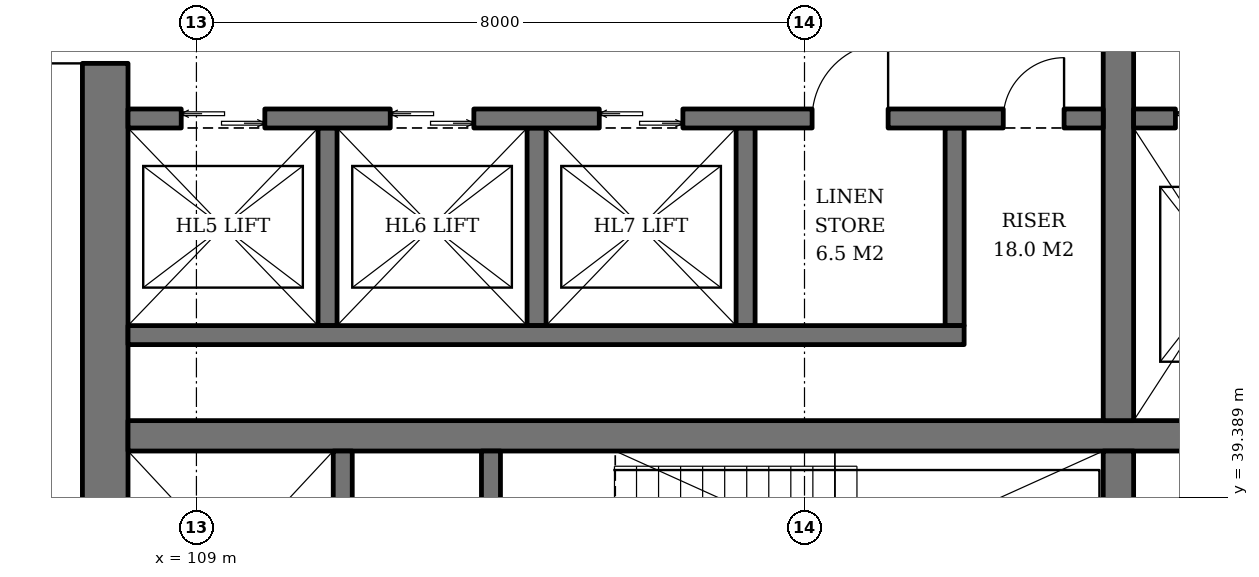
"""IFC4 building model, lengths in metres.
Left out: names, types, materials, properties, quantities, classifications, styles, units other than length and angle.
Written with IfcOpenShell. Run it as: python <this file> out.ifc"""

import sys

from ifc_helpers import new_model, si_unit, direction, frame, frame_2d, origin, place, context, subcontext, project, spatial, rectangle, extrude, element, fill, save


model = new_model("IFC4")
c1 = context("Model", 3, precision=1e-05, world=origin(), true_north=direction((0.0, 1.0)))
c2 = subcontext(c1, "Body", "Model", "MODEL_VIEW")
j1 = project(units=[si_unit("LENGTHUNIT", "METRE"), si_unit("PLANEANGLEUNIT", "RADIAN")], contexts=[c1])
p1 = place(None, origin())
s1 = spatial("IfcSite", under=j1, at=p1, CompositionType="ELEMENT")
p2 = place(p1, origin())
s2 = spatial("IfcBuilding", under=s1, at=p2, CompositionType="ELEMENT")
p3 = place(p2, frame((0.0, 0.0, 55.2)))
s3 = spatial("IfcBuildingStorey", under=s2, at=p3, CompositionType="ELEMENT", Elevation=55.2)
p4 = place(p3, frame((107.8, 37.1, 0.0), z_axis=(0.0, 0.0, 1.0), x_axis=(0.0, 1.0, 0.0)))
e1 = element("IfcWall", 1, at=p4, inside=s3, PredefinedType="SHEAR", context=c2, shape_type="SweptSolid", body=[
    extrude(rectangle(XDim=17.8, YDim=0.6, at=frame_2d((8.9, 0.0))), origin(), (0.0, 0.0, 1.0), 3.8),
])
p5 = place(p4, frame((8.0, 0.0, 0.0)))
e2 = element("IfcOpeningElement", 2, at=p5, cuts=e1, PredefinedType="OPENING", context=c2, shape_type="SweptSolid", body=[
    extrude(rectangle(XDim=1.8, YDim=2.4, at=frame_2d((0.9, 1.2))), frame((0.0, 0.31, 0.0), z_axis=(0.0, -1.0, 0.0), x_axis=(1.0, 0.0, 0.0)), (0.0, 0.0, 1.0), 0.62),
])
p6 = place(p3, frame((108.1, 40.2, 0.0), z_axis=(0.0, 0.0, 1.0), x_axis=(1.0, 0.0, 0.0)))
e3 = element("IfcWall", 3, at=p6, inside=s3, PredefinedType="SHEAR", context=c2, shape_type="SweptSolid", body=[
    extrude(rectangle(XDim=17.8, YDim=0.4, at=frame_2d((8.9, 0.0))), origin(), (0.0, 0.0, 1.0), 3.8),
])
p7 = place(p3, frame((121.13, 37.1, 0.0), z_axis=(0.0, 0.0, 1.0), x_axis=(0.0, 1.0, 0.0)))
e4 = element("IfcWall", 4, at=p7, inside=s3, PredefinedType="SHEAR", context=c2, shape_type="SweptSolid", body=[
    extrude(rectangle(XDim=2.9, YDim=0.4, at=frame_2d((1.45, 0.0))), origin(), (0.0, 0.0, 1.0), 3.8),
])
p8 = place(p3, frame((121.13, 40.4, 0.0), z_axis=(0.0, 0.0, 1.0), x_axis=(0.0, 1.0, 0.0)))
e5 = element("IfcWall", 5, at=p8, inside=s3, PredefinedType="SHEAR", context=c2, shape_type="SweptSolid", body=[
    extrude(rectangle(XDim=11.2, YDim=0.4, at=frame_2d((5.6, 0.0))), origin(), (0.0, 0.0, 1.0), 3.8),
])
p9 = place(p3, frame((110.925, 37.1, 0.0), z_axis=(0.0, 0.0, 1.0), x_axis=(0.0, 1.0, 0.0)))
e6 = element("IfcWall", 6, at=p9, inside=s3, PredefinedType="SHEAR", context=c2, shape_type="SweptSolid", body=[
    extrude(rectangle(XDim=2.9, YDim=0.25, at=frame_2d((1.45, 0.0))), origin(), (0.0, 0.0, 1.0), 3.8),
])
p10 = place(p9, frame((0.8, 0.0, 0.0)))
e7 = element("IfcOpeningElement", 7, at=p10, cuts=e6, PredefinedType="OPENING", context=c2, shape_type="SweptSolid", body=[
    extrude(rectangle(XDim=1.3, YDim=2.2, at=frame_2d((0.65, 1.1))), frame((0.0, 0.135, 0.0), z_axis=(0.0, -1.0, 0.0), x_axis=(1.0, 0.0, 0.0)), (0.0, 0.0, 1.0), 0.27),
])
p11 = place(p3, frame((112.875, 37.1, 0.0), z_axis=(0.0, 0.0, 1.0), x_axis=(0.0, 1.0, 0.0)))
e8 = element("IfcWall", 8, at=p11, inside=s3, PredefinedType="SHEAR", context=c2, shape_type="SweptSolid", body=[
    extrude(rectangle(XDim=2.9, YDim=0.25, at=frame_2d((1.45, 0.0))), origin(), (0.0, 0.0, 1.0), 3.8),
])
p12 = place(p11, frame((0.75, 0.0, 0.0)))
e9 = element("IfcOpeningElement", 9, at=p12, cuts=e8, PredefinedType="OPENING", context=c2, shape_type="SweptSolid", body=[
    extrude(rectangle(XDim=1.2, YDim=2.1, at=frame_2d((0.6, 1.05))), frame((0.0, 0.135, 0.0), z_axis=(0.0, -1.0, 0.0), x_axis=(1.0, 0.0, 0.0)), (0.0, 0.0, 1.0), 0.27),
])
for number, where, z_axis, x_axis in (
    (10, (110.725, 44.25, 0.0), (0.0, 0.0, 1.0), (0.0, -1.0, 0.0)),
    (11, (113.475, 44.25, 0.0), (0.0, 0.0, 1.0), (0.0, -1.0, 0.0)),
    (12, (116.225, 44.25, 0.0), (0.0, 0.0, 1.0), (0.0, -1.0, 0.0)),
    (13, (118.975, 44.25, 0.0), (0.0, 0.0, 1.0), (0.0, -1.0, 0.0)),
):
    element("IfcWall", number, at=place(p3, frame(where, z_axis=z_axis, x_axis=x_axis)), inside=s3, PredefinedType="SHEAR", context=c2, shape_type="SweptSolid", body=[
        extrude(rectangle(XDim=2.6, YDim=0.25, at=frame_2d((1.3, 0.0))), origin(), (0.0, 0.0, 1.0), 3.8),
    ])
p13 = place(p3, frame((108.1, 41.525, 0.0), z_axis=(0.0, 0.0, 1.0), x_axis=(1.0, 0.0, 0.0)))
e14 = element("IfcWall", 14, at=p13, inside=s3, PredefinedType="SHEAR", context=c2, shape_type="SweptSolid", body=[
    extrude(rectangle(XDim=11.0, YDim=0.25, at=frame_2d((5.5, 0.0))), origin(), (0.0, 0.0, 1.0), 3.8),
])
p14 = place(p3, frame((108.1, 44.375, 0.0), z_axis=(0.0, 0.0, 1.0), x_axis=(1.0, 0.0, 0.0)))
e15 = element("IfcWall", 15, at=p14, inside=s3, PredefinedType="SHEAR", context=c2, shape_type="SweptSolid", body=[
    extrude(rectangle(XDim=12.83, YDim=0.25, at=frame_2d((6.415, 0.0))), origin(), (0.0, 0.0, 1.0), 3.8),
])
p15 = place(p14, frame((0.7, 0.0, 0.0)))
e16 = element("IfcOpeningElement", 16, at=p15, cuts=e15, PredefinedType="OPENING", context=c2, shape_type="SweptSolid", body=[
    extrude(rectangle(XDim=1.1, YDim=2.2, at=frame_2d((0.55, 1.1))), frame((0.0, 0.135, 0.0), z_axis=(0.0, -1.0, 0.0), x_axis=(1.0, 0.0, 0.0)), (0.0, 0.0, 1.0), 0.27),
])
p16 = place(p14, frame((3.45, 0.0, 0.0)))
e17 = element("IfcOpeningElement", 17, at=p16, cuts=e15, PredefinedType="OPENING", context=c2, shape_type="SweptSolid", body=[
    extrude(rectangle(XDim=1.1, YDim=2.2, at=frame_2d((0.55, 1.1))), frame((0.0, 0.135, 0.0), z_axis=(0.0, -1.0, 0.0), x_axis=(1.0, 0.0, 0.0)), (0.0, 0.0, 1.0), 0.27),
])
p17 = place(p14, frame((6.2, 0.0, 0.0)))
e18 = element("IfcOpeningElement", 18, at=p17, cuts=e15, PredefinedType="OPENING", context=c2, shape_type="SweptSolid", body=[
    extrude(rectangle(XDim=1.1, YDim=2.2, at=frame_2d((0.55, 1.1))), frame((0.0, 0.135, 0.0), z_axis=(0.0, -1.0, 0.0), x_axis=(1.0, 0.0, 0.0)), (0.0, 0.0, 1.0), 0.27),
])
p18 = place(p14, frame((9.0, 0.0, 0.0)))
e19 = element("IfcOpeningElement", 19, at=p18, cuts=e15, PredefinedType="OPENING", context=c2, shape_type="SweptSolid", body=[
    extrude(rectangle(XDim=1.0, YDim=2.1, at=frame_2d((0.5, 1.05))), frame((0.0, 0.135, 0.0), z_axis=(0.0, -1.0, 0.0), x_axis=(1.0, 0.0, 0.0)), (0.0, 0.0, 1.0), 0.27),
])
p19 = place(p14, frame((11.515, 0.0, 0.0)))
e20 = element("IfcOpeningElement", 20, at=p19, cuts=e15, PredefinedType="OPENING", context=c2, shape_type="SweptSolid", body=[
    extrude(rectangle(XDim=0.8, YDim=2.0, at=frame_2d((0.4, 1.0))), frame((0.0, 0.135, 0.0), z_axis=(0.0, -1.0, 0.0), x_axis=(1.0, 0.0, 0.0)), (0.0, 0.0, 1.0), 0.27),
])
p20 = place(p3, frame((121.33, 44.375, 0.0), z_axis=(0.0, 0.0, 1.0), x_axis=(1.0, 0.0, 0.0)))
e21 = element("IfcWall", 21, at=p20, inside=s3, PredefinedType="SHEAR", context=c2, shape_type="SweptSolid", body=[
    extrude(rectangle(XDim=4.57, YDim=0.25, at=frame_2d((2.285, 0.0))), origin(), (0.0, 0.0, 1.0), 3.8),
])
p21 = place(p20, frame((0.55, 0.0, 0.0)))
e22 = element("IfcOpeningElement", 22, at=p21, cuts=e21, PredefinedType="OPENING", context=c2, shape_type="SweptSolid", body=[
    extrude(rectangle(XDim=1.4, YDim=2.4, at=frame_2d((0.7, 1.2))), frame((0.0, 0.135, 0.0), z_axis=(0.0, -1.0, 0.0), x_axis=(1.0, 0.0, 0.0)), (0.0, 0.0, 1.0), 0.27),
])
p22 = place(p20, frame((3.26, 0.0, 0.0)))
e23 = element("IfcOpeningElement", 23, at=p22, cuts=e21, PredefinedType="OPENING", context=c2, shape_type="SweptSolid", body=[
    extrude(rectangle(XDim=0.8, YDim=2.0, at=frame_2d((0.4, 1.0))), frame((0.0, 0.135, 0.0), z_axis=(0.0, -1.0, 0.0), x_axis=(1.0, 0.0, 0.0)), (0.0, 0.0, 1.0), 0.27),
])
p23 = place(p15, origin())
e24 = element("IfcDoor", 24, at=p23, inside=s3, OperationType="DOUBLE_DOOR_SLIDING", PredefinedType="DOOR", context=c2, shape_type="SweptSolid", body=[
    extrude(rectangle(XDim=1.1, YDim=2.2, at=frame_2d((0.55, 1.1))), frame((0.0, 0.025, 0.0), z_axis=(0.0, -1.0, 0.0), x_axis=(1.0, 0.0, 0.0)), (0.0, 0.0, 1.0), 0.05),
])
fill(e16, e24)
p24 = place(p16, origin())
e25 = element("IfcDoor", 25, at=p24, inside=s3, OperationType="DOUBLE_DOOR_SLIDING", PredefinedType="DOOR", context=c2, shape_type="SweptSolid", body=[
    extrude(rectangle(XDim=1.1, YDim=2.2, at=frame_2d((0.55, 1.1))), frame((0.0, 0.025, 0.0), z_axis=(0.0, -1.0, 0.0), x_axis=(1.0, 0.0, 0.0)), (0.0, 0.0, 1.0), 0.05),
])
fill(e17, e25)
p25 = place(p17, origin())
e26 = element("IfcDoor", 26, at=p25, inside=s3, OperationType="DOUBLE_DOOR_SLIDING", PredefinedType="DOOR", context=c2, shape_type="SweptSolid", body=[
    extrude(rectangle(XDim=1.1, YDim=2.2, at=frame_2d((0.55, 1.1))), frame((0.0, 0.025, 0.0), z_axis=(0.0, -1.0, 0.0), x_axis=(1.0, 0.0, 0.0)), (0.0, 0.0, 1.0), 0.05),
])
fill(e18, e26)
p26 = place(p18, origin())
e27 = element("IfcDoor", 27, at=p26, inside=s3, OperationType="SINGLE_SWING_RIGHT", PredefinedType="DOOR", context=c2, shape_type="SweptSolid", body=[
    extrude(rectangle(XDim=1.0, YDim=2.1, at=frame_2d((0.5, 1.05))), frame((0.0, 0.025, 0.0), z_axis=(0.0, -1.0, 0.0), x_axis=(1.0, 0.0, 0.0)), (0.0, 0.0, 1.0), 0.05),
])
fill(e19, e27)
p27 = place(p19, origin())
e28 = element("IfcDoor", 28, at=p27, inside=s3, OperationType="SINGLE_SWING_RIGHT", PredefinedType="DOOR", context=c2, shape_type="SweptSolid", body=[
    extrude(rectangle(XDim=0.8, YDim=2.0, at=frame_2d((0.4, 1.0))), frame((0.0, 0.025, 0.0), z_axis=(0.0, -1.0, 0.0), x_axis=(1.0, 0.0, 0.0)), (0.0, 0.0, 1.0), 0.05),
])
fill(e20, e28)
p28 = place(p21, origin())
e29 = element("IfcDoor", 29, at=p28, inside=s3, OperationType="DOUBLE_DOOR_SLIDING", PredefinedType="DOOR", context=c2, shape_type="SweptSolid", body=[
    extrude(rectangle(XDim=1.4, YDim=2.4, at=frame_2d((0.7, 1.2))), frame((0.0, 0.025, 0.0), z_axis=(0.0, -1.0, 0.0), x_axis=(1.0, 0.0, 0.0)), (0.0, 0.0, 1.0), 0.05),
])
fill(e22, e29)
p29 = place(p5, origin())
e30 = element("IfcDoor", 30, at=p29, inside=s3, OperationType="DOUBLE_DOOR_SINGLE_SWING", PredefinedType="DOOR", context=c2, shape_type="SweptSolid", body=[
    extrude(rectangle(XDim=1.8, YDim=2.4, at=frame_2d((0.9, 1.2))), frame((0.0, 0.025, 0.0), z_axis=(0.0, -1.0, 0.0), x_axis=(1.0, 0.0, 0.0)), (0.0, 0.0, 1.0), 0.05),
])
fill(e2, e30)
save(model, sys.argv[1])
